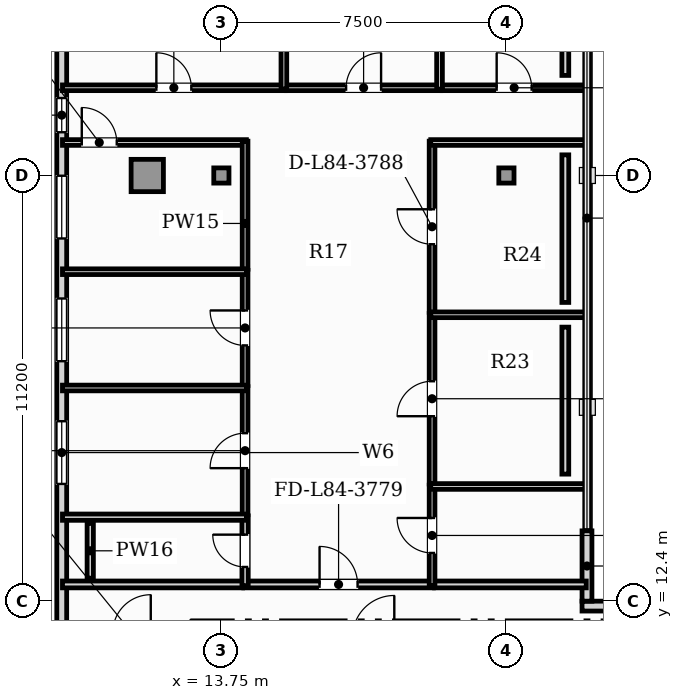
"""IFC4 building model, lengths in metres.
Left out: names, types, materials, properties, quantities, classifications, styles, units other than length and angle.
Written with IfcOpenShell. Run it as: python <this file> out.ifc"""

import sys

from ifc_helpers import new_model, si_unit, direction, frame, frame_2d, origin, origin_2d, place, context, subcontext, project, spatial, rectangle, hollow_rectangle, extrude, element, fill, save


model = new_model("IFC4")
c1 = context("Model", 3, precision=1e-05, world=origin(), true_north=direction((0.0, 1.0)))
c2 = subcontext(c1, "Body", "Model", "MODEL_VIEW")
j1 = project(units=[si_unit("LENGTHUNIT", "METRE"), si_unit("PLANEANGLEUNIT", "RADIAN")], contexts=[c1])
p1 = place(None, origin())
s1 = spatial("IfcSite", under=j1, at=p1, CompositionType="ELEMENT")
p2 = place(p1, origin())
s2 = spatial("IfcBuilding", under=s1, at=p2, CompositionType="ELEMENT")
p3 = place(p2, frame((0.0, 0.0, 341.35)))
s3 = spatial("IfcBuildingStorey", under=s2, at=p3, CompositionType="ELEMENT", Elevation=341.35)
p4 = place(p3, frame((11.8, 23.6, 0.0), z_axis=(0.0, 0.0, 1.0), x_axis=(1.0, 0.0, 0.0)))
e1 = element("IfcColumn", 1, at=p4, inside=s3, PredefinedType="USERDEFINED", context=c2, shape_type="SweptSolid", body=[
    extrude(hollow_rectangle(XDim=0.85, YDim=0.85, WallThickness=0.05, at=origin_2d()), origin(), (0.0, 0.0, 1.0), 3.85),
])
for number, where, z_axis, x_axis in (
    (2, (13.75, 23.6, 0.0), (0.0, 0.0, 1.0), (1.0, 0.0, 0.0)),
    (3, (21.25, 23.6, 0.0), (0.0, 0.0, 1.0), (1.0, 0.0, 0.0)),
):
    element("IfcColumn", number, at=place(p3, frame(where, z_axis=z_axis, x_axis=x_axis)), inside=s3, PredefinedType="COLUMN", context=c2, shape_type="SweptSolid", body=[
        extrude(hollow_rectangle(XDim=0.4, YDim=0.4, WallThickness=0.02, at=origin_2d()), origin(), (0.0, 0.0, 1.0), 3.85),
    ])
p5 = place(p3, frame((34.26, 12.27, 0.0), z_axis=(0.0, 0.0, 1.0), x_axis=(-1.0, 0.0, 0.0)))
e4 = element("IfcWall", 4, at=p5, inside=s3, PredefinedType="SOLIDWALL", context=c2, shape_type="SweptSolid", body=[
    extrude(rectangle(XDim=11.02, YDim=0.26, at=frame_2d((5.51, 0.0))), origin(), (0.0, 0.0, 1.0), 3.63),
])
p6 = place(p3, frame((23.37, 12.4, 0.0), z_axis=(0.0, 0.0, 1.0), x_axis=(0.0, 1.0, 0.0)))
e5 = element("IfcWall", 5, at=p6, inside=s3, PredefinedType="SOLIDWALL", context=c2, shape_type="SweptSolid", body=[
    extrude(rectangle(XDim=1.85, YDim=0.26, at=frame_2d((0.925, 0.0))), origin(), (0.0, 0.0, 1.0), 3.17),
])
p7 = place(p3, frame((9.55, 28.408, 0.0), z_axis=(0.0, 0.0, 1.0), x_axis=(0.0, -1.0, 0.0)))
e6 = element("IfcWall", 6, at=p7, inside=s3, PredefinedType="SOLIDWALL", context=c2, shape_type="SweptSolid", body=[
    extrude(rectangle(XDim=25.168, YDim=0.26, at=frame_2d((12.584, 0.0))), origin(), (0.0, 0.0, 1.0), 3.63),
])
p8 = place(p7, frame((19.503, 0.0, 0.88)))
e7 = element("IfcOpeningElement", 7, at=p8, cuts=e6, PredefinedType="OPENING", context=c2, shape_type="SweptSolid", body=[
    extrude(rectangle(XDim=1.65, YDim=2.0, at=frame_2d((0.825, 1.0))), frame((0.0, 0.14, 0.0), z_axis=(0.0, -1.0, 0.0), x_axis=(1.0, 0.0, 0.0)), (0.0, 0.0, 1.0), 0.28),
])
p9 = place(p7, frame((2.77, 0.0, 0.95)))
e8 = element("IfcOpeningElement", 8, at=p9, cuts=e6, PredefinedType="OPENING", context=c2, shape_type="SweptSolid", body=[
    extrude(rectangle(XDim=0.9, YDim=1.5, at=frame_2d((0.45, 0.75))), frame((0.0, 0.14, 0.0), z_axis=(0.0, -1.0, 0.0), x_axis=(1.0, 0.0, 0.0)), (0.0, 0.0, 1.0), 0.28),
])
p10 = place(p7, frame((11.274, 0.0, 0.88)))
e9 = element("IfcOpeningElement", 9, at=p10, cuts=e6, PredefinedType="OPENING", context=c2, shape_type="SweptSolid", body=[
    extrude(rectangle(XDim=1.65, YDim=2.0, at=frame_2d((0.825, 1.0))), frame((0.0, 0.14, 0.0), z_axis=(0.0, -1.0, 0.0), x_axis=(1.0, 0.0, 0.0)), (0.0, 0.0, 1.0), 0.28),
])
p11 = place(p7, frame((8.044, 0.0, 0.88)))
e10 = element("IfcOpeningElement", 10, at=p11, cuts=e6, PredefinedType="OPENING", context=c2, shape_type="SweptSolid", body=[
    extrude(rectangle(XDim=1.65, YDim=2.0, at=frame_2d((0.825, 1.0))), frame((0.0, 0.14, 0.0), z_axis=(0.0, -1.0, 0.0), x_axis=(1.0, 0.0, 0.0)), (0.0, 0.0, 1.0), 0.28),
])
p12 = place(p7, frame((4.815, 0.0, 0.88)))
e11 = element("IfcOpeningElement", 11, at=p12, cuts=e6, PredefinedType="OPENING", context=c2, shape_type="SweptSolid", body=[
    extrude(rectangle(XDim=1.65, YDim=2.0, at=frame_2d((0.825, 1.0))), frame((0.0, 0.14, 0.0), z_axis=(0.0, -1.0, 0.0), x_axis=(1.0, 0.0, 0.0)), (0.0, 0.0, 1.0), 0.28),
])
p13 = place(p3, frame((14.339, 12.84, 0.0), z_axis=(0.0, 0.0, 1.0), x_axis=(1.0, 0.0, 0.0)))
e12 = element("IfcWall", 12, at=p13, inside=s3, PredefinedType="PARTITIONING", context=c2, shape_type="SweptSolid", body=[
    extrude(rectangle(XDim=4.99, YDim=0.18, at=frame_2d((2.495, 0.0))), origin(), (0.0, 0.0, 1.0), 3.63),
])
p14 = place(p13, frame((1.995, 0.0, 0.0)))
e13 = element("IfcOpeningElement", 13, at=p14, cuts=e12, PredefinedType="OPENING", context=c2, shape_type="SweptSolid", body=[
    extrude(rectangle(XDim=1.0, YDim=2.15, at=frame_2d((0.5, 1.075))), frame((0.0, 0.1, 0.0), z_axis=(0.0, -1.0, 0.0), x_axis=(1.0, 0.0, 0.0)), (0.0, 0.0, 1.0), 0.2),
])
p15 = place(p3, frame((9.569, 12.84, 0.0), z_axis=(0.0, 0.0, 1.0), x_axis=(1.0, 0.0, 0.0)))
e14 = element("IfcWall", 14, at=p15, inside=s3, PredefinedType="PARTITIONING", context=c2, shape_type="SweptSolid", body=[
    extrude(rectangle(XDim=4.74, YDim=0.18, at=frame_2d((2.37, 0.0))), origin(), (0.0, 0.0, 1.0), 3.63),
])
p16 = place(p3, frame((19.359, 12.84, 0.0), z_axis=(0.0, 0.0, 1.0), x_axis=(1.0, 0.0, 0.0)))
e15 = element("IfcWall", 15, at=p16, inside=s3, PredefinedType="PARTITIONING", context=c2, shape_type="SweptSolid", body=[
    extrude(rectangle(XDim=3.992, YDim=0.18, at=frame_2d((1.996, 0.0))), origin(), (0.0, 0.0, 1.0), 3.63),
])
p17 = place(p3, frame((14.374, 12.805, 0.0), z_axis=(0.0, 0.0, 1.0), x_axis=(0.0, 1.0, 0.0)))
e16 = element("IfcWall", 16, at=p17, inside=s3, PredefinedType="PLUMBINGWALL", context=c2, shape_type="SweptSolid", body=[
    extrude(rectangle(XDim=1.84, YDim=0.165, at=frame_2d((0.92, 0.0))), origin(), (0.0, 0.0, 1.0), 3.63),
])
p18 = place(p17, frame((0.495, 0.0, 0.0)))
e17 = element("IfcOpeningElement", 17, at=p18, cuts=e16, PredefinedType="OPENING", context=c2, shape_type="SweptSolid", body=[
    extrude(rectangle(XDim=0.85, YDim=2.1, at=frame_2d((0.425, 1.05))), frame((0.0, 0.093, 0.0), z_axis=(0.0, -1.0, 0.0), x_axis=(1.0, 0.0, 0.0)), (0.0, 0.0, 1.0), 0.185),
])
p19 = place(p3, frame((14.374, 14.675, 0.0), z_axis=(0.0, 0.0, 1.0), x_axis=(0.0, 1.0, 0.0)))
e18 = element("IfcWall", 18, at=p19, inside=s3, PredefinedType="PARTITIONING", context=c2, shape_type="SweptSolid", body=[
    extrude(rectangle(XDim=3.369, YDim=0.15, at=frame_2d((1.685, 0.0))), origin(), (0.0, 0.0, 1.0), 3.63),
])
p20 = place(p19, frame((1.225, 0.0, 0.0)))
e19 = element("IfcOpeningElement", 19, at=p20, cuts=e18, PredefinedType="OPENING", context=c2, shape_type="SweptSolid", body=[
    extrude(rectangle(XDim=0.92, YDim=2.1, at=frame_2d((0.46, 1.05))), frame((0.0, 0.085, 0.0), z_axis=(0.0, -1.0, 0.0), x_axis=(1.0, 0.0, 0.0)), (0.0, 0.0, 1.0), 0.17),
])
p21 = place(p3, frame((14.374, 18.074, 0.0), z_axis=(0.0, 0.0, 1.0), x_axis=(0.0, 1.0, 0.0)))
e20 = element("IfcWall", 20, at=p21, inside=s3, PredefinedType="PARTITIONING", context=c2, shape_type="SweptSolid", body=[
    extrude(rectangle(XDim=3.03, YDim=0.15, at=frame_2d((1.515, 0.0))), origin(), (0.0, 0.0, 1.0), 3.63),
])
p22 = place(p21, frame((1.055, 0.0, 0.0)))
e21 = element("IfcOpeningElement", 21, at=p22, cuts=e20, PredefinedType="OPENING", context=c2, shape_type="SweptSolid", body=[
    extrude(rectangle(XDim=0.92, YDim=2.1, at=frame_2d((0.46, 1.05))), frame((0.0, 0.085, 0.0), z_axis=(0.0, -1.0, 0.0), x_axis=(1.0, 0.0, 0.0)), (0.0, 0.0, 1.0), 0.17),
])
p23 = place(p3, frame((9.569, 24.468, 0.0), z_axis=(0.0, 0.0, 1.0), x_axis=(1.0, 0.0, 0.0)))
e22 = element("IfcWall", 22, at=p23, inside=s3, PredefinedType="PARTITIONING", context=c2, shape_type="SweptSolid", body=[
    extrude(rectangle(XDim=4.84, YDim=0.15, at=frame_2d((2.42, 0.0))), origin(), (0.0, 0.0, 1.0), 3.63),
])
p24 = place(p23, frame((0.508, 0.0, 0.0)))
e23 = element("IfcOpeningElement", 23, at=p24, cuts=e22, PredefinedType="OPENING", context=c2, shape_type="SweptSolid", body=[
    extrude(rectangle(XDim=0.92, YDim=2.1, at=frame_2d((0.46, 1.05))), frame((0.0, 0.085, 0.0), z_axis=(0.0, -1.0, 0.0), x_axis=(1.0, 0.0, 0.0)), (0.0, 0.0, 1.0), 0.17),
])
p25 = place(p3, frame((14.374, 21.134, 0.0), z_axis=(0.0, 0.0, 1.0), x_axis=(0.0, 1.0, 0.0)))
e24 = element("IfcWall", 24, at=p25, inside=s3, PredefinedType="PARTITIONING", context=c2, shape_type="SweptSolid", body=[
    extrude(rectangle(XDim=3.369, YDim=0.15, at=frame_2d((1.685, 0.0))), origin(), (0.0, 0.0, 1.0), 3.63),
])
p26 = place(p3, frame((19.294, 12.805, 0.0), z_axis=(0.0, 0.0, 1.0), x_axis=(0.0, 1.0, 0.0)))
e25 = element("IfcWall", 25, at=p26, inside=s3, PredefinedType="PARTITIONING", context=c2, shape_type="SweptSolid", body=[
    extrude(rectangle(XDim=2.648, YDim=0.15, at=frame_2d((1.324, 0.0))), origin(), (0.0, 0.0, 1.0), 3.63),
])
p27 = place(p26, frame((0.864, 0.0, 0.0)))
e26 = element("IfcOpeningElement", 26, at=p27, cuts=e25, PredefinedType="OPENING", context=c2, shape_type="SweptSolid", body=[
    extrude(rectangle(XDim=0.92, YDim=2.1, at=frame_2d((0.46, 1.05))), frame((0.0, 0.085, 0.0), z_axis=(0.0, -1.0, 0.0), x_axis=(1.0, 0.0, 0.0)), (0.0, 0.0, 1.0), 0.17),
])
p28 = place(p3, frame((19.294, 15.483, 0.0), z_axis=(0.0, 0.0, 1.0), x_axis=(0.0, 1.0, 0.0)))
e27 = element("IfcWall", 27, at=p28, inside=s3, PredefinedType="PARTITIONING", context=c2, shape_type="SweptSolid", body=[
    extrude(rectangle(XDim=4.488, YDim=0.15, at=frame_2d((2.244, 0.0))), origin(), (0.0, 0.0, 1.0), 3.63),
])
p29 = place(p28, frame((1.784, 0.0, 0.0)))
e28 = element("IfcOpeningElement", 28, at=p29, cuts=e27, PredefinedType="OPENING", context=c2, shape_type="SweptSolid", body=[
    extrude(rectangle(XDim=0.92, YDim=2.1, at=frame_2d((0.46, 1.05))), frame((0.0, 0.085, 0.0), z_axis=(0.0, -1.0, 0.0), x_axis=(1.0, 0.0, 0.0)), (0.0, 0.0, 1.0), 0.17),
])
p30 = place(p3, frame((19.294, 20.0, 0.0), z_axis=(0.0, 0.0, 1.0), x_axis=(0.0, 1.0, 0.0)))
e29 = element("IfcWall", 29, at=p30, inside=s3, PredefinedType="PARTITIONING", context=c2, shape_type="SweptSolid", body=[
    extrude(rectangle(XDim=4.503, YDim=0.15, at=frame_2d((2.251, 0.0))), origin(), (0.0, 0.0, 1.0), 3.63),
])
p31 = place(p30, frame((1.792, 0.0, 0.0)))
e30 = element("IfcOpeningElement", 30, at=p31, cuts=e29, PredefinedType="OPENING", context=c2, shape_type="SweptSolid", body=[
    extrude(rectangle(XDim=0.92, YDim=2.1, at=frame_2d((0.46, 1.05))), frame((0.0, 0.085, 0.0), z_axis=(0.0, -1.0, 0.0), x_axis=(1.0, 0.0, 0.0)), (0.0, 0.0, 1.0), 0.17),
])
p32 = place(p3, frame((19.259, 24.468, 0.0), z_axis=(0.0, 0.0, 1.0), x_axis=(1.0, 0.0, 0.0)))
e31 = element("IfcWall", 31, at=p32, inside=s3, PredefinedType="PARTITIONING", context=c2, shape_type="SweptSolid", body=[
    extrude(rectangle(XDim=4.093, YDim=0.15, at=frame_2d((2.047, 0.0))), origin(), (0.0, 0.0, 1.0), 3.63),
])
p33 = place(p3, frame((9.569, 25.908, 0.0), z_axis=(0.0, 0.0, 1.0), x_axis=(1.0, 0.0, 0.0)))
e32 = element("IfcWall", 32, at=p33, inside=s3, PredefinedType="PARTITIONING", context=c2, shape_type="SweptSolid", body=[
    extrude(rectangle(XDim=5.861, YDim=0.15, at=frame_2d((2.93, 0.0))), origin(), (0.0, 0.0, 1.0), 3.63),
])
p34 = place(p33, frame((2.47, 0.0, 0.0)))
e33 = element("IfcOpeningElement", 33, at=p34, cuts=e32, PredefinedType="OPENING", context=c2, shape_type="SweptSolid", body=[
    extrude(rectangle(XDim=0.92, YDim=2.1, at=frame_2d((0.46, 1.05))), frame((0.0, 0.085, 0.0), z_axis=(0.0, -1.0, 0.0), x_axis=(1.0, 0.0, 0.0)), (0.0, 0.0, 1.0), 0.17),
])
p35 = place(p3, frame((15.46, 25.908, 0.0), z_axis=(0.0, 0.0, 1.0), x_axis=(1.0, 0.0, 0.0)))
e34 = element("IfcWall", 34, at=p35, inside=s3, PredefinedType="PARTITIONING", context=c2, shape_type="SweptSolid", body=[
    extrude(rectangle(XDim=4.065, YDim=0.15, at=frame_2d((2.033, 0.0))), origin(), (0.0, 0.0, 1.0), 3.63),
])
p36 = place(p35, frame((1.573, 0.0, 0.0)))
e35 = element("IfcOpeningElement", 35, at=p36, cuts=e34, PredefinedType="OPENING", context=c2, shape_type="SweptSolid", body=[
    extrude(rectangle(XDim=0.92, YDim=2.1, at=frame_2d((0.46, 1.05))), frame((0.0, 0.085, 0.0), z_axis=(0.0, -1.0, 0.0), x_axis=(1.0, 0.0, 0.0)), (0.0, 0.0, 1.0), 0.17),
])
p37 = place(p3, frame((19.555, 25.908, 0.0), z_axis=(0.0, 0.0, 1.0), x_axis=(1.0, 0.0, 0.0)))
e36 = element("IfcWall", 36, at=p37, inside=s3, PredefinedType="PARTITIONING", context=c2, shape_type="SweptSolid", body=[
    extrude(rectangle(XDim=3.797, YDim=0.15, at=frame_2d((1.898, 0.0))), origin(), (0.0, 0.0, 1.0), 3.63),
])
p38 = place(p37, frame((1.439, 0.0, 0.0)))
e37 = element("IfcOpeningElement", 37, at=p38, cuts=e36, PredefinedType="OPENING", context=c2, shape_type="SweptSolid", body=[
    extrude(rectangle(XDim=0.92, YDim=2.1, at=frame_2d((0.46, 1.05))), frame((0.0, 0.085, 0.0), z_axis=(0.0, -1.0, 0.0), x_axis=(1.0, 0.0, 0.0)), (0.0, 0.0, 1.0), 0.17),
])
p39 = place(p3, frame((9.569, 14.61, 0.0), z_axis=(0.0, 0.0, 1.0), x_axis=(1.0, 0.0, 0.0)))
e38 = element("IfcWall", 38, at=p39, inside=s3, PredefinedType="PLUMBINGWALL", context=c2, shape_type="SweptSolid", body=[
    extrude(rectangle(XDim=4.84, YDim=0.165, at=frame_2d((2.42, 0.0))), origin(), (0.0, 0.0, 1.0), 3.63),
])
for number, where, z_axis, x_axis in (
    (39, (9.569, 18.009, 0.0), (0.0, 0.0, 1.0), (1.0, 0.0, 0.0)),
    (40, (9.569, 21.069, 0.0), (0.0, 0.0, 1.0), (1.0, 0.0, 0.0)),
):
    element("IfcWall", number, at=place(p3, frame(where, z_axis=z_axis, x_axis=x_axis)), inside=s3, PredefinedType="PARTITIONING", context=c2, shape_type="SweptSolid", body=[
        extrude(rectangle(XDim=4.84, YDim=0.15, at=frame_2d((2.42, 0.0))), origin(), (0.0, 0.0, 1.0), 3.63),
    ])
for number, where, z_axis, x_axis in (
    (41, (19.259, 15.417, 0.0), (0.0, 0.0, 1.0), (1.0, 0.0, 0.0)),
    (42, (19.259, 19.935, 0.0), (0.0, 0.0, 1.0), (1.0, 0.0, 0.0)),
):
    element("IfcWall", number, at=place(p3, frame(where, z_axis=z_axis, x_axis=x_axis)), inside=s3, PredefinedType="PARTITIONING", context=c2, shape_type="SweptSolid", body=[
        extrude(rectangle(XDim=4.093, YDim=0.15, at=frame_2d((2.047, 0.0))), origin(), (0.0, 0.0, 1.0), 3.63),
    ])
p40 = place(p3, frame((15.395, 25.873, 0.0), z_axis=(0.0, 0.0, 1.0), x_axis=(0.0, 1.0, 0.0)))
e43 = element("IfcWall", 43, at=p40, inside=s3, PredefinedType="PARTITIONING", context=c2, shape_type="SweptSolid", body=[
    extrude(rectangle(XDim=5.443, YDim=0.15, at=frame_2d((2.722, 0.0))), origin(), (0.0, 0.0, 1.0), 3.63),
])
p41 = place(p3, frame((19.49, 25.873, 0.0), z_axis=(0.0, 0.0, 1.0), x_axis=(0.0, 1.0, 0.0)))
e44 = element("IfcWall", 44, at=p41, inside=s3, PredefinedType="PARTITIONING", context=c2, shape_type="SweptSolid", body=[
    extrude(rectangle(XDim=5.625, YDim=0.15, at=frame_2d((2.813, 0.0))), origin(), (0.0, 0.0, 1.0), 3.63),
])
p42 = place(p3, frame((10.3, 13.005, 0.0), z_axis=(0.0, 0.0, 1.0), x_axis=(0.0, 1.0, 0.0)))
e45 = element("IfcWall", 45, at=p42, inside=s3, PredefinedType="PLUMBINGWALL", context=c2, shape_type="SweptSolid", body=[
    extrude(rectangle(XDim=1.44, YDim=0.165, at=frame_2d((0.72, 0.0))), origin(), (0.0, 0.0, 1.0), 3.63),
])
p43 = place(p3, frame((22.8, 19.61, 0.0), z_axis=(0.0, 0.0, 1.0), x_axis=(0.0, -1.0, 0.0)))
e46 = element("IfcWall", 46, at=p43, inside=s3, PredefinedType="PARTITIONING", context=c2, shape_type="SweptSolid", body=[
    extrude(rectangle(XDim=3.867, YDim=0.18, at=frame_2d((1.934, 0.0))), origin(), (0.0, 0.0, 1.0), 3.63),
])
p44 = place(p3, frame((22.8, 24.143, 0.0), z_axis=(0.0, 0.0, 1.0), x_axis=(0.0, -1.0, 0.0)))
e47 = element("IfcWall", 47, at=p44, inside=s3, PredefinedType="PARTITIONING", context=c2, shape_type="SweptSolid", body=[
    extrude(rectangle(XDim=3.883, YDim=0.18, at=frame_2d((1.941, 0.0))), origin(), (0.0, 0.0, 1.0), 3.63),
])
p45 = place(p3, frame((22.8, 29.692, 0.0), z_axis=(0.0, 0.0, 1.0), x_axis=(0.0, -1.0, 0.0)))
e48 = element("IfcWall", 48, at=p45, inside=s3, PredefinedType="PARTITIONING", context=c2, shape_type="SweptSolid", body=[
    extrude(rectangle(XDim=3.458, YDim=0.18, at=frame_2d((1.729, 0.0))), origin(), (0.0, 0.0, 1.0), 3.63),
])
p46 = place(p9, origin())
e49 = element("IfcWindow", 49, at=p46, inside=s3, PartitioningType="SINGLE_PANEL", PredefinedType="WINDOW", context=c2, shape_type="SweptSolid", body=[
    extrude(rectangle(XDim=0.9, YDim=1.5, at=frame_2d((0.45, 0.75))), frame((0.0, 0.03, 0.0), z_axis=(0.0, -1.0, 0.0), x_axis=(1.0, 0.0, 0.0)), (0.0, 0.0, 1.0), 0.06),
])
fill(e8, e49)
p47 = place(p10, origin())
e50 = element("IfcWindow", 50, at=p47, inside=s3, PartitioningType="SINGLE_PANEL", PredefinedType="WINDOW", context=c2, shape_type="SweptSolid", body=[
    extrude(rectangle(XDim=1.65, YDim=2.0, at=frame_2d((0.825, 1.0))), frame((0.0, 0.03, 0.0), z_axis=(0.0, -1.0, 0.0), x_axis=(1.0, 0.0, 0.0)), (0.0, 0.0, 1.0), 0.06),
])
fill(e9, e50)
p48 = place(p11, origin())
e51 = element("IfcWindow", 51, at=p48, inside=s3, PartitioningType="SINGLE_PANEL", PredefinedType="WINDOW", context=c2, shape_type="SweptSolid", body=[
    extrude(rectangle(XDim=1.65, YDim=2.0, at=frame_2d((0.825, 1.0))), frame((0.0, 0.03, 0.0), z_axis=(0.0, -1.0, 0.0), x_axis=(1.0, 0.0, 0.0)), (0.0, 0.0, 1.0), 0.06),
])
fill(e10, e51)
p49 = place(p12, origin())
e52 = element("IfcWindow", 52, at=p49, inside=s3, PartitioningType="SINGLE_PANEL", PredefinedType="WINDOW", context=c2, shape_type="SweptSolid", body=[
    extrude(rectangle(XDim=1.65, YDim=2.0, at=frame_2d((0.825, 1.0))), frame((0.0, 0.03, 0.0), z_axis=(0.0, -1.0, 0.0), x_axis=(1.0, 0.0, 0.0)), (0.0, 0.0, 1.0), 0.06),
])
fill(e11, e52)
p50 = place(p14, origin())
e53 = element("IfcDoor", 53, at=p50, inside=s3, OperationType="SINGLE_SWING_LEFT", PredefinedType="DOOR", context=c2, shape_type="SweptSolid", body=[
    extrude(rectangle(XDim=1.0, YDim=2.15, at=frame_2d((0.5, 1.075))), frame((0.0, 0.025, 0.0), z_axis=(0.0, -1.0, 0.0), x_axis=(1.0, 0.0, 0.0)), (0.0, 0.0, 1.0), 0.05),
])
fill(e13, e53)
p51 = place(p18, origin())
e54 = element("IfcDoor", 54, at=p51, inside=s3, OperationType="SINGLE_SWING_RIGHT", PredefinedType="DOOR", context=c2, shape_type="SweptSolid", body=[
    extrude(rectangle(XDim=0.85, YDim=2.1, at=frame_2d((0.425, 1.05))), frame((0.0, 0.025, 0.0), z_axis=(0.0, -1.0, 0.0), x_axis=(1.0, 0.0, 0.0)), (0.0, 0.0, 1.0), 0.05),
])
fill(e17, e54)
p52 = place(p20, origin())
e55 = element("IfcDoor", 55, at=p52, inside=s3, OperationType="SINGLE_SWING_LEFT", PredefinedType="DOOR", context=c2, shape_type="SweptSolid", body=[
    extrude(rectangle(XDim=0.92, YDim=2.1, at=frame_2d((0.46, 1.05))), frame((0.0, 0.025, 0.0), z_axis=(0.0, -1.0, 0.0), x_axis=(1.0, 0.0, 0.0)), (0.0, 0.0, 1.0), 0.05),
])
fill(e19, e55)
p53 = place(p22, origin())
e56 = element("IfcDoor", 56, at=p53, inside=s3, OperationType="SINGLE_SWING_RIGHT", PredefinedType="DOOR", context=c2, shape_type="SweptSolid", body=[
    extrude(rectangle(XDim=0.92, YDim=2.1, at=frame_2d((0.46, 1.05))), frame((0.0, 0.025, 0.0), z_axis=(0.0, -1.0, 0.0), x_axis=(1.0, 0.0, 0.0)), (0.0, 0.0, 1.0), 0.05),
])
fill(e21, e56)
p54 = place(p24, origin())
e57 = element("IfcDoor", 57, at=p54, inside=s3, OperationType="SINGLE_SWING_LEFT", PredefinedType="DOOR", context=c2, shape_type="SweptSolid", body=[
    extrude(rectangle(XDim=0.92, YDim=2.1, at=frame_2d((0.46, 1.05))), frame((0.0, 0.025, 0.0), z_axis=(0.0, -1.0, 0.0), x_axis=(1.0, 0.0, 0.0)), (0.0, 0.0, 1.0), 0.05),
])
fill(e23, e57)
p55 = place(p27, origin())
e58 = element("IfcDoor", 58, at=p55, inside=s3, OperationType="SINGLE_SWING_RIGHT", PredefinedType="DOOR", context=c2, shape_type="SweptSolid", body=[
    extrude(rectangle(XDim=0.92, YDim=2.1, at=frame_2d((0.46, 1.05))), frame((0.0, 0.025, 0.0), z_axis=(0.0, -1.0, 0.0), x_axis=(1.0, 0.0, 0.0)), (0.0, 0.0, 1.0), 0.05),
])
fill(e26, e58)
p56 = place(p29, origin())
e59 = element("IfcDoor", 59, at=p56, inside=s3, OperationType="SINGLE_SWING_LEFT", PredefinedType="DOOR", context=c2, shape_type="SweptSolid", body=[
    extrude(rectangle(XDim=0.92, YDim=2.1, at=frame_2d((0.46, 1.05))), frame((0.0, 0.025, 0.0), z_axis=(0.0, -1.0, 0.0), x_axis=(1.0, 0.0, 0.0)), (0.0, 0.0, 1.0), 0.05),
])
fill(e28, e59)
p57 = place(p31, origin())
e60 = element("IfcDoor", 60, at=p57, inside=s3, OperationType="SINGLE_SWING_RIGHT", PredefinedType="DOOR", context=c2, shape_type="SweptSolid", body=[
    extrude(rectangle(XDim=0.92, YDim=2.1, at=frame_2d((0.46, 1.05))), frame((0.0, 0.025, 0.0), z_axis=(0.0, -1.0, 0.0), x_axis=(1.0, 0.0, 0.0)), (0.0, 0.0, 1.0), 0.05),
])
fill(e30, e60)
p58 = place(p34, origin())
e61 = element("IfcDoor", 61, at=p58, inside=s3, OperationType="SINGLE_SWING_LEFT", PredefinedType="DOOR", context=c2, shape_type="SweptSolid", body=[
    extrude(rectangle(XDim=0.92, YDim=2.1, at=frame_2d((0.46, 1.05))), frame((0.0, 0.025, 0.0), z_axis=(0.0, -1.0, 0.0), x_axis=(1.0, 0.0, 0.0)), (0.0, 0.0, 1.0), 0.05),
])
fill(e33, e61)
p59 = place(p36, origin())
e62 = element("IfcDoor", 62, at=p59, inside=s3, OperationType="SINGLE_SWING_RIGHT", PredefinedType="DOOR", context=c2, shape_type="SweptSolid", body=[
    extrude(rectangle(XDim=0.92, YDim=2.1, at=frame_2d((0.46, 1.05))), frame((0.0, 0.025, 0.0), z_axis=(0.0, -1.0, 0.0), x_axis=(1.0, 0.0, 0.0)), (0.0, 0.0, 1.0), 0.05),
])
fill(e35, e62)
p60 = place(p38, origin())
e63 = element("IfcDoor", 63, at=p60, inside=s3, OperationType="SINGLE_SWING_LEFT", PredefinedType="DOOR", context=c2, shape_type="SweptSolid", body=[
    extrude(rectangle(XDim=0.92, YDim=2.1, at=frame_2d((0.46, 1.05))), frame((0.0, 0.025, 0.0), z_axis=(0.0, -1.0, 0.0), x_axis=(1.0, 0.0, 0.0)), (0.0, 0.0, 1.0), 0.05),
])
fill(e37, e63)
save(model, sys.argv[1])
